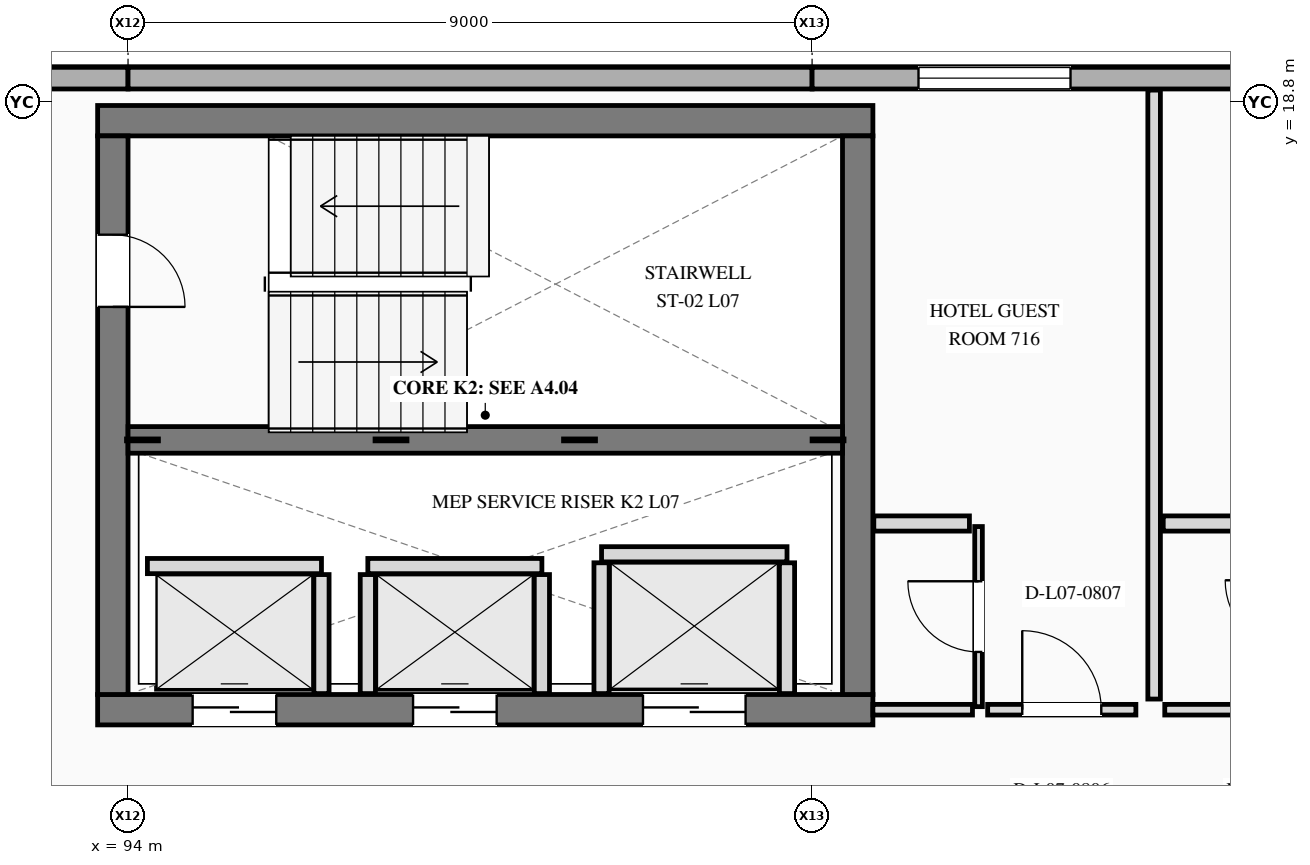
"""IFC4 building model, lengths in metres.
Left out: names, types, materials, properties, quantities, classifications, styles, units other than length and angle.
Written with IfcOpenShell. Run it as: python <this file> out.ifc"""

import sys

from ifc_helpers import new_model, si_unit, direction, frame, frame_2d, origin, place, context, subcontext, project, spatial, rectangle, extrude, element, fill, save


model = new_model("IFC4")
c1 = context("Model", 3, precision=1e-05, world=origin(), true_north=direction((0.0, 1.0)))
c2 = subcontext(c1, "Body", "Model", "MODEL_VIEW")
j1 = project(units=[si_unit("LENGTHUNIT", "METRE"), si_unit("PLANEANGLEUNIT", "RADIAN")], contexts=[c1])
p1 = place(None, origin())
s1 = spatial("IfcSite", under=j1, at=p1, CompositionType="ELEMENT")
p2 = place(p1, origin())
s2 = spatial("IfcBuilding", under=s1, at=p2, CompositionType="ELEMENT")
p3 = place(p2, frame((0.0, 0.0, 30.6)))
s3 = spatial("IfcBuildingStorey", under=s2, at=p3, CompositionType="ELEMENT", Elevation=30.6)
for number, where, z_axis, x_axis in (
    (1, (94.0, 19.11, 0.0), (0.0, 0.0, 1.0), (-1.0, 0.0, 0.0)),
    (2, (103.0, 19.11, 0.0), (0.0, 0.0, 1.0), (-1.0, 0.0, 0.0)),
):
    element("IfcWall", number, at=place(p3, frame(where, z_axis=z_axis, x_axis=x_axis)), inside=s3, PredefinedType="STANDARD", context=c2, shape_type="SweptSolid", body=[
        extrude(rectangle(XDim=9.0, YDim=0.285, at=frame_2d((4.5, 0.0))), origin(), (0.0, 0.0, 1.0), 3.5),
    ])
p4 = place(p3, frame((112.0, 19.11, 0.0), z_axis=(0.0, 0.0, 1.0), x_axis=(-1.0, 0.0, 0.0)))
e3 = element("IfcWall", 3, at=p4, inside=s3, PredefinedType="STANDARD", context=c2, shape_type="SweptSolid", body=[
    extrude(rectangle(XDim=9.0, YDim=0.285, at=frame_2d((4.5, 0.0))), origin(), (0.0, 0.0, 1.0), 3.5),
])
p5 = place(p4, frame((5.6, 0.0, 0.85)))
e4 = element("IfcOpeningElement", 4, at=p5, cuts=e3, PredefinedType="OPENING", context=c2, shape_type="SweptSolid", body=[
    extrude(rectangle(XDim=2.0, YDim=1.65, at=frame_2d((1.0, 0.825))), frame((0.0, 0.152, 0.0), z_axis=(0.0, -1.0, 0.0), x_axis=(1.0, 0.0, 0.0)), (0.0, 0.0, 1.0), 0.305),
])
p6 = place(p4, frame((1.4, 0.0, 0.85)))
e5 = element("IfcOpeningElement", 5, at=p6, cuts=e3, PredefinedType="OPENING", context=c2, shape_type="SweptSolid", body=[
    extrude(rectangle(XDim=2.0, YDim=1.65, at=frame_2d((1.0, 0.825))), frame((0.0, 0.152, 0.0), z_axis=(0.0, -1.0, 0.0), x_axis=(1.0, 0.0, 0.0)), (0.0, 0.0, 1.0), 0.305),
])
p7 = place(p3, frame((93.6, 10.8, 0.0), z_axis=(0.0, 0.0, 1.0), x_axis=(1.0, 0.0, 0.0)))
e6 = element("IfcWall", 6, at=p7, inside=s3, PredefinedType="SHEAR", context=c2, shape_type="SweptSolid", body=[
    extrude(rectangle(XDim=10.2, YDim=0.4, at=frame_2d((5.1, 0.0))), origin(), (0.0, 0.0, 1.0), 3.5),
])
p8 = place(p7, frame((1.25, 0.0, 0.0)))
e7 = element("IfcOpeningElement", 7, at=p8, cuts=e6, PredefinedType="OPENING", context=c2, shape_type="SweptSolid", body=[
    extrude(rectangle(XDim=1.1, YDim=2.2, at=frame_2d((0.55, 1.1))), frame((0.0, 0.21, 0.0), z_axis=(0.0, -1.0, 0.0), x_axis=(1.0, 0.0, 0.0)), (0.0, 0.0, 1.0), 0.42),
])
p9 = place(p7, frame((4.15, 0.0, 0.0)))
e8 = element("IfcOpeningElement", 8, at=p9, cuts=e6, PredefinedType="OPENING", context=c2, shape_type="SweptSolid", body=[
    extrude(rectangle(XDim=1.1, YDim=2.2, at=frame_2d((0.55, 1.1))), frame((0.0, 0.21, 0.0), z_axis=(0.0, -1.0, 0.0), x_axis=(1.0, 0.0, 0.0)), (0.0, 0.0, 1.0), 0.42),
])
p10 = place(p7, frame((7.175, 0.0, 0.0)))
e9 = element("IfcOpeningElement", 9, at=p10, cuts=e6, PredefinedType="OPENING", context=c2, shape_type="SweptSolid", body=[
    extrude(rectangle(XDim=1.35, YDim=2.3, at=frame_2d((0.675, 1.15))), frame((0.0, 0.21, 0.0), z_axis=(0.0, -1.0, 0.0), x_axis=(1.0, 0.0, 0.0)), (0.0, 0.0, 1.0), 0.42),
])
p11 = place(p3, frame((103.8, 18.55, 0.0), z_axis=(0.0, 0.0, 1.0), x_axis=(-1.0, 0.0, 0.0)))
e10 = element("IfcWall", 10, at=p11, inside=s3, PredefinedType="SHEAR", context=c2, shape_type="SweptSolid", body=[
    extrude(rectangle(XDim=10.2, YDim=0.4, at=frame_2d((5.1, 0.0))), origin(), (0.0, 0.0, 1.0), 3.5),
])
p12 = place(p3, frame((93.8, 18.35, 0.0), z_axis=(0.0, 0.0, 1.0), x_axis=(0.0, -1.0, 0.0)))
e11 = element("IfcWall", 11, at=p12, inside=s3, PredefinedType="SHEAR", context=c2, shape_type="SweptSolid", body=[
    extrude(rectangle(XDim=7.35, YDim=0.4, at=frame_2d((3.675, 0.0))), origin(), (0.0, 0.0, 1.0), 3.5),
])
p13 = place(p12, frame((1.3, 0.0, 0.0)))
e12 = element("IfcOpeningElement", 12, at=p13, cuts=e11, PredefinedType="OPENING", context=c2, shape_type="SweptSolid", body=[
    extrude(rectangle(XDim=0.95, YDim=2.2, at=frame_2d((0.475, 1.1))), frame((0.0, 0.21, 0.0), z_axis=(0.0, -1.0, 0.0), x_axis=(1.0, 0.0, 0.0)), (0.0, 0.0, 1.0), 0.42),
])
p14 = place(p3, frame((103.6, 11.0, 0.0), z_axis=(0.0, 0.0, 1.0), x_axis=(0.0, 1.0, 0.0)))
e13 = element("IfcWall", 13, at=p14, inside=s3, PredefinedType="SHEAR", context=c2, shape_type="SweptSolid", body=[
    extrude(rectangle(XDim=7.35, YDim=0.4, at=frame_2d((3.675, 0.0))), origin(), (0.0, 0.0, 1.0), 3.5),
])
p15 = place(p3, frame((94.0, 14.35, 0.0), z_axis=(0.0, 0.0, 1.0), x_axis=(1.0, 0.0, 0.0)))
e14 = element("IfcWall", 14, at=p15, inside=s3, PredefinedType="SHEAR", context=c2, shape_type="SweptSolid", body=[
    extrude(rectangle(XDim=9.4, YDim=0.35, at=frame_2d((4.7, 0.0))), origin(), (0.0, 0.0, 1.0), 3.5),
])
p16 = place(p3, frame((94.255, 12.69, 0.0), z_axis=(0.0, 0.0, 1.0), x_axis=(1.0, 0.0, 0.0)))
e15 = element("IfcWall", 15, at=p16, inside=s3, PredefinedType="PLUMBINGWALL", context=c2, shape_type="SweptSolid", body=[
    extrude(rectangle(XDim=2.29, YDim=0.2, at=frame_2d((1.145, 0.0))), origin(), (0.0, 0.0, 1.0), 3.2),
])
p17 = place(p3, frame((96.545, 11.012, 0.0), z_axis=(0.0, 0.0, 1.0), x_axis=(0.0, 1.0, 0.0)))
e16 = element("IfcWall", 16, at=p17, inside=s3, PredefinedType="PLUMBINGWALL", context=c2, shape_type="SweptSolid", body=[
    extrude(rectangle(XDim=1.566, YDim=0.2, at=frame_2d((0.783, 0.0))), origin(), (0.0, 0.0, 1.0), 3.2),
])
p18 = place(p3, frame((97.155, 12.69, 0.0), z_axis=(0.0, 0.0, 1.0), x_axis=(1.0, 0.0, 0.0)))
e17 = element("IfcWall", 17, at=p18, inside=s3, PredefinedType="PLUMBINGWALL", context=c2, shape_type="SweptSolid", body=[
    extrude(rectangle(XDim=2.29, YDim=0.2, at=frame_2d((1.145, 0.0))), origin(), (0.0, 0.0, 1.0), 3.2),
])
for number, where, z_axis, x_axis in (
    (18, (97.155, 11.012, 0.0), (0.0, 0.0, 1.0), (0.0, 1.0, 0.0)),
    (19, (99.445, 11.012, 0.0), (0.0, 0.0, 1.0), (0.0, 1.0, 0.0)),
):
    element("IfcWall", number, at=place(p3, frame(where, z_axis=z_axis, x_axis=x_axis)), inside=s3, PredefinedType="PLUMBINGWALL", context=c2, shape_type="SweptSolid", body=[
        extrude(rectangle(XDim=1.566, YDim=0.2, at=frame_2d((0.783, 0.0))), origin(), (0.0, 0.0, 1.0), 3.2),
    ])
p19 = place(p3, frame((100.23, 12.845, 0.0), z_axis=(0.0, 0.0, 1.0), x_axis=(1.0, 0.0, 0.0)))
e20 = element("IfcWall", 20, at=p19, inside=s3, PredefinedType="PLUMBINGWALL", context=c2, shape_type="SweptSolid", body=[
    extrude(rectangle(XDim=2.44, YDim=0.2, at=frame_2d((1.22, 0.0))), origin(), (0.0, 0.0, 1.0), 3.2),
])
for number, where, z_axis, x_axis in (
    (21, (100.23, 11.012, 0.0), (0.0, 0.0, 1.0), (0.0, 1.0, 0.0)),
    (22, (102.67, 11.012, 0.0), (0.0, 0.0, 1.0), (0.0, 1.0, 0.0)),
):
    element("IfcWall", number, at=place(p3, frame(where, z_axis=z_axis, x_axis=x_axis)), inside=s3, PredefinedType="PLUMBINGWALL", context=c2, shape_type="SweptSolid", body=[
        extrude(rectangle(XDim=1.721, YDim=0.2, at=frame_2d((0.86, 0.0))), origin(), (0.0, 0.0, 1.0), 3.2),
    ])
p20 = place(p3, frame((103.8, 10.8, 0.0), z_axis=(0.0, 0.0, 1.0), x_axis=(1.0, 0.0, 0.0)))
e23 = element("IfcWall", 23, at=p20, inside=s3, PredefinedType="PARTITIONING", context=c2, shape_type="SweptSolid", body=[
    extrude(rectangle(XDim=1.31, YDim=0.14, at=frame_2d((0.655, 0.0))), origin(), (0.0, 0.0, 1.0), 3.2),
])
p21 = place(p3, frame((105.31, 10.8, 0.0), z_axis=(0.0, 0.0, 1.0), x_axis=(1.0, 0.0, 0.0)))
e24 = element("IfcWall", 24, at=p21, inside=s3, PredefinedType="PARTITIONING", context=c2, shape_type="SweptSolid", body=[
    extrude(rectangle(XDim=1.95, YDim=0.14, at=frame_2d((0.975, 0.0))), origin(), (0.0, 0.0, 1.0), 3.2),
])
p22 = place(p21, frame((0.455, 0.0, 0.0)))
e25 = element("IfcOpeningElement", 25, at=p22, cuts=e24, PredefinedType="OPENING", context=c2, shape_type="SweptSolid", body=[
    extrude(rectangle(XDim=1.04, YDim=2.4, at=frame_2d((0.52, 1.2))), frame((0.0, 0.08, 0.0), z_axis=(0.0, -1.0, 0.0), x_axis=(1.0, 0.0, 0.0)), (0.0, 0.0, 1.0), 0.16),
])
p23 = place(p3, frame((107.5, 10.94, 0.0), z_axis=(0.0, 0.0, 1.0), x_axis=(0.0, 1.0, 0.0)))
e26 = element("IfcWall", 26, at=p23, inside=s3, PredefinedType="PARTITIONING", context=c2, shape_type="SweptSolid", body=[
    extrude(rectangle(XDim=8.012, YDim=0.165, at=frame_2d((4.006, 0.0))), origin(), (0.0, 0.0, 1.0), 3.2),
])
p24 = place(p3, frame((105.19, 10.84, 0.0), z_axis=(0.0, 0.0, 1.0), x_axis=(0.0, 1.0, 0.0)))
e27 = element("IfcWall", 27, at=p24, inside=s3, PredefinedType="PARTITIONING", context=c2, shape_type="SweptSolid", body=[
    extrude(rectangle(XDim=2.37, YDim=0.1, at=frame_2d((1.185, 0.0))), origin(), (0.0, 0.0, 1.0), 3.2),
])
p25 = place(p24, frame((0.72, 0.0, 0.0)))
e28 = element("IfcOpeningElement", 28, at=p25, cuts=e27, PredefinedType="OPENING", context=c2, shape_type="SweptSolid", body=[
    extrude(rectangle(XDim=0.93, YDim=2.22, at=frame_2d((0.465, 1.11))), frame((0.0, 0.06, 0.0), z_axis=(0.0, -1.0, 0.0), x_axis=(1.0, 0.0, 0.0)), (0.0, 0.0, 1.0), 0.12),
])
p26 = place(p3, frame((103.812, 13.25, 0.0), z_axis=(0.0, 0.0, 1.0), x_axis=(1.0, 0.0, 0.0)))
e29 = element("IfcWall", 29, at=p26, inside=s3, PredefinedType="PLUMBINGWALL", context=c2, shape_type="SweptSolid", body=[
    extrude(rectangle(XDim=1.258, YDim=0.2, at=frame_2d((0.629, 0.0))), origin(), (0.0, 0.0, 1.0), 3.2),
])
p27 = place(p3, frame((107.64, 10.8, 0.0), z_axis=(0.0, 0.0, 1.0), x_axis=(1.0, 0.0, 0.0)))
e30 = element("IfcWall", 30, at=p27, inside=s3, PredefinedType="PARTITIONING", context=c2, shape_type="SweptSolid", body=[
    extrude(rectangle(XDim=1.67, YDim=0.14, at=frame_2d((0.835, 0.0))), origin(), (0.0, 0.0, 1.0), 3.2),
])
p28 = place(p3, frame((107.62, 13.25, 0.0), z_axis=(0.0, 0.0, 1.0), x_axis=(1.0, 0.0, 0.0)))
e31 = element("IfcWall", 31, at=p28, inside=s3, PredefinedType="PLUMBINGWALL", context=c2, shape_type="SweptSolid", body=[
    extrude(rectangle(XDim=1.65, YDim=0.2, at=frame_2d((0.825, 0.0))), origin(), (0.0, 0.0, 1.0), 3.2),
])
p29 = place(p5, origin())
e32 = element("IfcWindow", 32, at=p29, inside=s3, PartitioningType="SINGLE_PANEL", PredefinedType="WINDOW", context=c2, shape_type="SweptSolid", body=[
    extrude(rectangle(XDim=2.0, YDim=1.65, at=frame_2d((1.0, 0.825))), frame((0.0, 0.03, 0.0), z_axis=(0.0, -1.0, 0.0), x_axis=(1.0, 0.0, 0.0)), (0.0, 0.0, 1.0), 0.06),
])
fill(e4, e32)
p30 = place(p13, origin())
e33 = element("IfcDoor", 33, at=p30, inside=s3, OperationType="SINGLE_SWING_RIGHT", PredefinedType="DOOR", context=c2, shape_type="SweptSolid", body=[
    extrude(rectangle(XDim=0.95, YDim=2.2, at=frame_2d((0.475, 1.1))), frame((0.0, 0.025, 0.0), z_axis=(0.0, -1.0, 0.0), x_axis=(1.0, 0.0, 0.0)), (0.0, 0.0, 1.0), 0.05),
])
fill(e12, e33)
p31 = place(p8, origin())
e34 = element("IfcDoor", 34, at=p31, inside=s3, OperationType="SLIDING_TO_LEFT", PredefinedType="DOOR", context=c2, shape_type="SweptSolid", body=[
    extrude(rectangle(XDim=1.1, YDim=2.2, at=frame_2d((0.55, 1.1))), frame((0.0, 0.025, 0.0), z_axis=(0.0, -1.0, 0.0), x_axis=(1.0, 0.0, 0.0)), (0.0, 0.0, 1.0), 0.05),
])
fill(e7, e34)
p32 = place(p9, origin())
e35 = element("IfcDoor", 35, at=p32, inside=s3, OperationType="SLIDING_TO_RIGHT", PredefinedType="DOOR", context=c2, shape_type="SweptSolid", body=[
    extrude(rectangle(XDim=1.1, YDim=2.2, at=frame_2d((0.55, 1.1))), frame((0.0, 0.025, 0.0), z_axis=(0.0, -1.0, 0.0), x_axis=(1.0, 0.0, 0.0)), (0.0, 0.0, 1.0), 0.05),
])
fill(e8, e35)
p33 = place(p10, origin())
e36 = element("IfcDoor", 36, at=p33, inside=s3, OperationType="SLIDING_TO_LEFT", PredefinedType="DOOR", context=c2, shape_type="SweptSolid", body=[
    extrude(rectangle(XDim=1.35, YDim=2.3, at=frame_2d((0.675, 1.15))), frame((0.0, 0.025, 0.0), z_axis=(0.0, -1.0, 0.0), x_axis=(1.0, 0.0, 0.0)), (0.0, 0.0, 1.0), 0.05),
])
fill(e9, e36)
p34 = place(p22, origin())
e37 = element("IfcDoor", 37, at=p34, inside=s3, OperationType="SINGLE_SWING_LEFT", PredefinedType="DOOR", context=c2, shape_type="SweptSolid", body=[
    extrude(rectangle(XDim=1.04, YDim=2.4, at=frame_2d((0.52, 1.2))), frame((0.0, 0.025, 0.0), z_axis=(0.0, -1.0, 0.0), x_axis=(1.0, 0.0, 0.0)), (0.0, 0.0, 1.0), 0.05),
])
fill(e25, e37)
p35 = place(p25, origin())
e38 = element("IfcDoor", 38, at=p35, inside=s3, OperationType="SINGLE_SWING_RIGHT", PredefinedType="DOOR", context=c2, shape_type="SweptSolid", body=[
    extrude(rectangle(XDim=0.93, YDim=2.22, at=frame_2d((0.465, 1.11))), frame((0.0, 0.025, 0.0), z_axis=(0.0, -1.0, 0.0), x_axis=(1.0, 0.0, 0.0)), (0.0, 0.0, 1.0), 0.05),
])
fill(e28, e38)
save(model, sys.argv[1])
